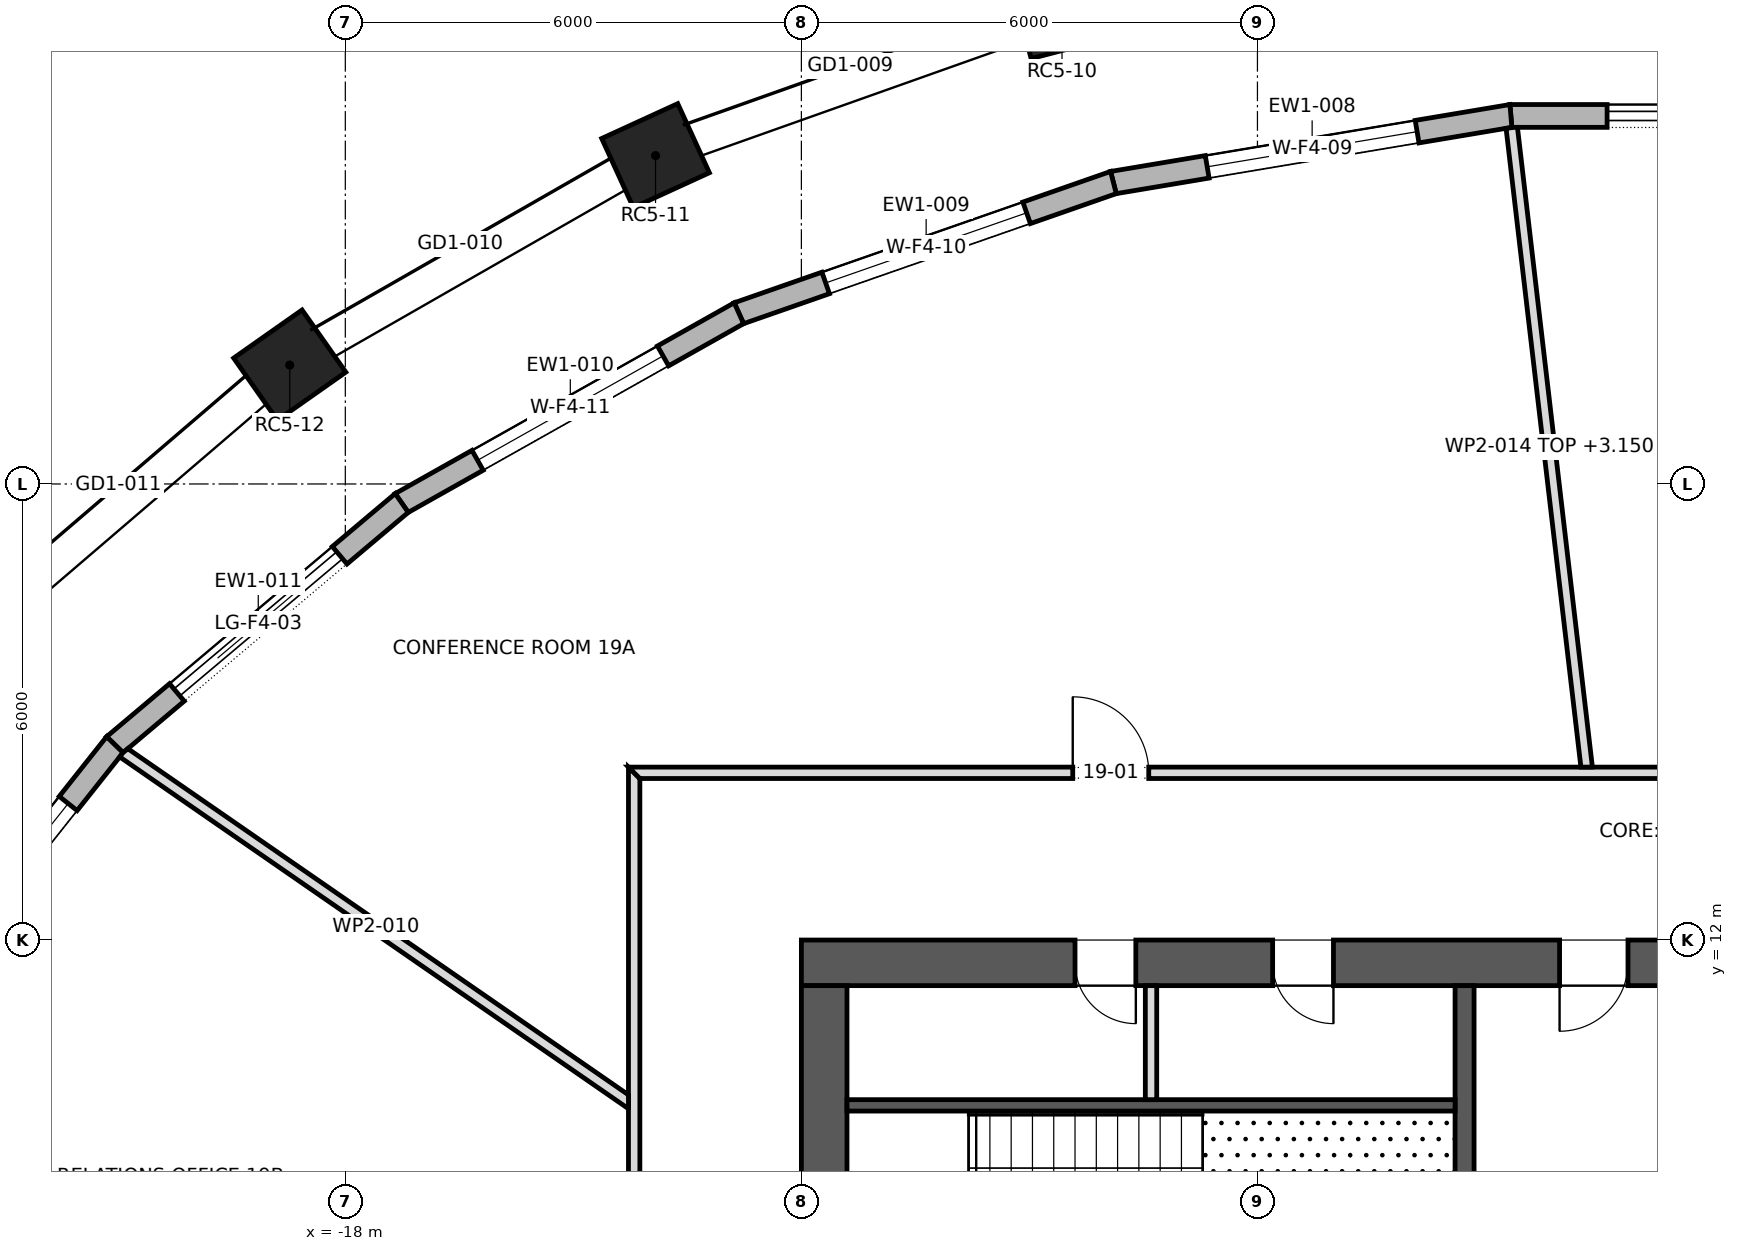
"""IFC4 building model, lengths in metres.
Left out: names, types, materials, properties, quantities, classifications, styles, units other than length and angle.
Written with IfcOpenShell. Run it as: python <this file> out.ifc"""

import sys

from ifc_helpers import new_model, si_unit, direction, frame, frame_2d, origin, origin_2d, place, context, subcontext, project, spatial, polyline, rectangle, outline, extrude, element, fill, save


model = new_model("IFC4")
c1 = context("Model", 3, precision=1e-05, world=origin(), true_north=direction((0.0, 1.0)))
c2 = subcontext(c1, "Body", "Model", "MODEL_VIEW")
j1 = project(units=[si_unit("LENGTHUNIT", "METRE"), si_unit("PLANEANGLEUNIT", "RADIAN")], contexts=[c1])
p1 = place(None, origin())
s1 = spatial("IfcSite", under=j1, at=p1, CompositionType="ELEMENT")
p2 = place(p1, origin())
s2 = spatial("IfcBuilding", under=s1, at=p2, CompositionType="ELEMENT")
p3 = place(p2, frame((0.0, 0.0, 276.3)))
s3 = spatial("IfcBuildingStorey", under=s2, at=p3, CompositionType="ELEMENT", Elevation=276.3)
for number, where, z_axis, x_axis in (
    (1, (-8.571, 24.219, 0.0), (0.0, 0.0, 1.0), (-0.968, -0.252, 0.0)),
    (2, (-13.919, 22.32, 0.0), (0.0, 0.0, 1.0), (-0.909, -0.417, 0.0)),
    (3, (-18.731, 19.564, 0.0), (0.0, 0.0, 1.0), (-0.818, -0.575, 0.0)),
):
    element("IfcColumn", number, at=place(p3, frame(where, z_axis=z_axis, x_axis=x_axis)), inside=s3, PredefinedType="COLUMN", context=c2, shape_type="SweptSolid", body=[
        extrude(rectangle(XDim=1.1, YDim=1.0, at=origin_2d()), origin(), (0.0, 0.0, 1.0), 4.0),
    ])
p4 = place(p3, frame((-12.0, 11.7, 0.0), z_axis=(0.0, 0.0, 1.0), x_axis=(1.0, 0.0, 0.0)))
e4 = element("IfcWall", 4, at=p4, inside=s3, PredefinedType="SHEAR", context=c2, shape_type="SweptSolid", body=[
    extrude(rectangle(XDim=24.0, YDim=0.6, at=frame_2d((12.0, 0.0))), origin(), (0.0, 0.0, 1.0), 4.0),
])
p5 = place(p4, frame((9.975, 0.0, 0.0)))
e5 = element("IfcOpeningElement", 5, at=p5, cuts=e4, PredefinedType="OPENING", context=c2, shape_type="SweptSolid", body=[
    extrude(rectangle(XDim=0.9, YDim=2.1, at=frame_2d((0.45, 1.05))), frame((0.0, 0.312, 0.0), z_axis=(0.0, -1.0, 0.0), x_axis=(1.0, 0.0, 0.0)), (0.0, 0.0, 1.0), 0.624),
])
p6 = place(p4, frame((3.6, 0.0, 0.0)))
e6 = element("IfcOpeningElement", 6, at=p6, cuts=e4, PredefinedType="OPENING", context=c2, shape_type="SweptSolid", body=[
    extrude(rectangle(XDim=0.8, YDim=2.1, at=frame_2d((0.4, 1.05))), frame((0.0, 0.312, 0.0), z_axis=(0.0, -1.0, 0.0), x_axis=(1.0, 0.0, 0.0)), (0.0, 0.0, 1.0), 0.624),
])
p7 = place(p4, frame((6.2, 0.0, 0.0)))
e7 = element("IfcOpeningElement", 7, at=p7, cuts=e4, PredefinedType="OPENING", context=c2, shape_type="SweptSolid", body=[
    extrude(rectangle(XDim=0.8, YDim=2.1, at=frame_2d((0.4, 1.05))), frame((0.0, 0.312, 0.0), z_axis=(0.0, -1.0, 0.0), x_axis=(1.0, 0.0, 0.0)), (0.0, 0.0, 1.0), 0.624),
])
p8 = place(p4, frame((15.85, 0.0, 0.0)))
e8 = element("IfcOpeningElement", 8, at=p8, cuts=e4, PredefinedType="OPENING", context=c2, shape_type="SweptSolid", body=[
    extrude(rectangle(XDim=0.8, YDim=2.1, at=frame_2d((0.4, 1.05))), frame((0.0, 0.312, 0.0), z_axis=(0.0, -1.0, 0.0), x_axis=(1.0, 0.0, 0.0)), (0.0, 0.0, 1.0), 0.624),
])
p9 = place(p3, frame((-11.7, -11.4, 0.0), z_axis=(0.0, 0.0, 1.0), x_axis=(0.0, 1.0, 0.0)))
e9 = element("IfcWall", 9, at=p9, inside=s3, PredefinedType="SHEAR", context=c2, shape_type="SweptSolid", body=[
    extrude(rectangle(XDim=22.8, YDim=0.6, at=frame_2d((11.4, 0.0))), origin(), (0.0, 0.0, 1.0), 4.0),
])
p10 = place(p9, frame((10.2, 0.0, 0.0)))
e10 = element("IfcOpeningElement", 10, at=p10, cuts=e9, PredefinedType="OPENING", context=c2, shape_type="SweptSolid", body=[
    extrude(rectangle(XDim=2.4, YDim=2.1, at=frame_2d((1.2, 1.05))), frame((0.0, 0.312, 0.0), z_axis=(0.0, -1.0, 0.0), x_axis=(1.0, 0.0, 0.0)), (0.0, 0.0, 1.0), 0.624),
])
p11 = place(p9, frame((18.925, 0.0, 0.0)))
e11 = element("IfcOpeningElement", 11, at=p11, cuts=e9, PredefinedType="OPENING", context=c2, shape_type="SweptSolid", body=[
    extrude(rectangle(XDim=1.2, YDim=2.1, at=frame_2d((0.6, 1.05))), frame((0.0, 0.312, 0.0), z_axis=(0.0, -1.0, 0.0), x_axis=(1.0, 0.0, 0.0)), (0.0, 0.0, 1.0), 0.624),
])
p12 = place(p9, frame((2.675, 0.0, 0.0)))
e12 = element("IfcOpeningElement", 12, at=p12, cuts=e9, PredefinedType="OPENING", context=c2, shape_type="SweptSolid", body=[
    extrude(rectangle(XDim=1.2, YDim=2.1, at=frame_2d((0.6, 1.05))), frame((0.0, 0.312, 0.0), z_axis=(0.0, -1.0, 0.0), x_axis=(1.0, 0.0, 0.0)), (0.0, 0.0, 1.0), 0.624),
])
p13 = place(p3, frame((2.666, 22.842, 0.0), z_axis=(0.0, 0.0, 1.0), x_axis=(-1.0, 0.0, 0.0)))
e13 = element("IfcWall", 13, at=p13, inside=s3, PredefinedType="STANDARD", context=c2, shape_type="SweptSolid", body=[
    extrude(outline(polyline([(-0.012, -0.15), (5.344, -0.15), (5.319, 0.15), (0.012, 0.15), (-0.012, -0.15)])), origin(), (0.0, 0.0, 1.0), 3.7),
])
p14 = place(p13, frame((1.266, 0.0, 0.0)))
e14 = element("IfcOpeningElement", 14, at=p14, cuts=e13, PredefinedType="OPENING", context=c2, shape_type="SweptSolid", body=[
    extrude(rectangle(XDim=2.8, YDim=3.25, at=frame_2d((1.4, 1.625))), frame((0.0, 0.162, 0.0), z_axis=(0.0, -1.0, 0.0), x_axis=(1.0, 0.0, 0.0)), (0.0, 0.0, 1.0), 0.324),
])
p15 = place(p3, frame((-2.666, 22.842, 0.0), z_axis=(0.0, 0.0, 1.0), x_axis=(-0.986250435411, -0.165257612993, 0.0)))
e15 = element("IfcWall", 15, at=p15, inside=s3, PredefinedType="STANDARD", context=c2, shape_type="SweptSolid", body=[
    extrude(outline(polyline([(-0.012, -0.15), (5.315, -0.15), (5.29, 0.15), (0.012, 0.15), (-0.012, -0.15)])), origin(), (0.0, 0.0, 1.0), 3.7),
])
p16 = place(p15, frame((1.251, 0.0, 0.6)))
e16 = element("IfcOpeningElement", 16, at=p16, cuts=e15, PredefinedType="OPENING", context=c2, shape_type="SweptSolid", body=[
    extrude(rectangle(XDim=2.8, YDim=2.65, at=frame_2d((1.4, 1.325))), frame((0.0, 0.162, 0.0), z_axis=(0.0, -1.0, 0.0), x_axis=(1.0, 0.0, 0.0)), (0.0, 0.0, 1.0), 0.324),
])
p17 = place(p3, frame((-7.895, 21.966, 0.0), z_axis=(0.0, 0.0, 1.0), x_axis=(-0.9441693858, -0.329460423904, 0.0)))
e17 = element("IfcWall", 17, at=p17, inside=s3, PredefinedType="STANDARD", context=c2, shape_type="SweptSolid", body=[
    extrude(outline(polyline([(-0.013, -0.15), (5.232, -0.15), (5.205, 0.15), (0.013, 0.15), (-0.013, -0.15)])), origin(), (0.0, 0.0, 1.0), 3.7),
])
p18 = place(p17, frame((1.209, 0.0, 0.6)))
e18 = element("IfcOpeningElement", 18, at=p18, cuts=e17, PredefinedType="OPENING", context=c2, shape_type="SweptSolid", body=[
    extrude(rectangle(XDim=2.8, YDim=2.65, at=frame_2d((1.4, 1.325))), frame((0.0, 0.162, 0.0), z_axis=(0.0, -1.0, 0.0), x_axis=(1.0, 0.0, 0.0)), (0.0, 0.0, 1.0), 0.324),
])
p19 = place(p3, frame((-12.822, 20.246, 0.0), z_axis=(0.0, 0.0, 1.0), x_axis=(-0.871433320402, -0.490513983585, 0.0)))
e19 = element("IfcWall", 19, at=p19, inside=s3, PredefinedType="STANDARD", context=c2, shape_type="SweptSolid", body=[
    extrude(outline(polyline([(-0.013, -0.15), (5.104, -0.15), (5.076, 0.15), (0.013, 0.15), (-0.013, -0.15)])), origin(), (0.0, 0.0, 1.0), 3.7),
])
p20 = place(p19, frame((1.145, 0.0, 0.6)))
e20 = element("IfcOpeningElement", 20, at=p20, cuts=e19, PredefinedType="OPENING", context=c2, shape_type="SweptSolid", body=[
    extrude(rectangle(XDim=2.8, YDim=2.65, at=frame_2d((1.4, 1.325))), frame((0.0, 0.162, 0.0), z_axis=(0.0, -1.0, 0.0), x_axis=(1.0, 0.0, 0.0)), (0.0, 0.0, 1.0), 0.324),
])
p21 = place(p3, frame((-17.258, 17.75, 0.0), z_axis=(0.0, 0.0, 1.0), x_axis=(-0.764832940795, -0.644228664897, 0.0)))
e21 = element("IfcWall", 21, at=p21, inside=s3, PredefinedType="STANDARD", context=c2, shape_type="SweptSolid", body=[
    extrude(outline(polyline([(-0.014, -0.15), (4.95, -0.15), (4.92, 0.15), (0.014, 0.15), (-0.014, -0.15)])), origin(), (0.0, 0.0, 1.0), 3.7),
])
p22 = place(p21, frame((1.068, 0.0, 0.0)))
e22 = element("IfcOpeningElement", 22, at=p22, cuts=e21, PredefinedType="OPENING", context=c2, shape_type="SweptSolid", body=[
    extrude(rectangle(XDim=2.8, YDim=3.25, at=frame_2d((1.4, 1.625))), frame((0.0, 0.162, 0.0), z_axis=(0.0, -1.0, 0.0), x_axis=(1.0, 0.0, 0.0)), (0.0, 0.0, 1.0), 0.324),
])
p23 = place(p3, frame((-21.032, 14.57, 0.0), z_axis=(0.0, 0.0, 1.0), x_axis=(-0.621434755851, -0.783465917715, 0.0)))
e23 = element("IfcWall", 23, at=p23, inside=s3, PredefinedType="STANDARD", context=c2, shape_type="SweptSolid", body=[
    extrude(outline(polyline([(-0.015, -0.15), (4.791, -0.15), (4.759, 0.15), (0.015, 0.15), (-0.015, -0.15)])), origin(), (0.0, 0.0, 1.0), 3.7),
])
p24 = place(p23, frame((0.987, 0.0, 0.6)))
e24 = element("IfcOpeningElement", 24, at=p24, cuts=e23, PredefinedType="OPENING", context=c2, shape_type="SweptSolid", body=[
    extrude(rectangle(XDim=2.8, YDim=2.65, at=frame_2d((1.4, 1.325))), frame((0.0, 0.162, 0.0), z_axis=(0.0, -1.0, 0.0), x_axis=(1.0, 0.0, 0.0)), (0.0, 0.0, 1.0), 0.324),
])
p25 = place(p3, frame((-3.275, 6.5, 0.0), z_axis=(0.0, 0.0, 1.0), x_axis=(0.0, 1.0, 0.0)))
e25 = element("IfcWall", 25, at=p25, inside=s3, PredefinedType="SHEAR", context=c2, shape_type="SweptSolid", body=[
    extrude(rectangle(XDim=4.9, YDim=0.25, at=frame_2d((2.45, 0.0))), origin(), (0.0, 0.0, 1.0), 3.7),
])
p26 = place(p3, frame((-11.4, 9.825, 0.0), z_axis=(0.0, 0.0, 1.0), x_axis=(1.0, 0.0, 0.0)))
e26 = element("IfcWall", 26, at=p26, inside=s3, PredefinedType="SHEAR", context=c2, shape_type="SweptSolid", body=[
    extrude(rectangle(XDim=8.0, YDim=0.15, at=frame_2d((4.0, 0.0))), origin(), (0.0, 0.0, 1.0), 3.7),
])
p27 = place(p3, frame((-7.4, 9.9, 0.0), z_axis=(0.0, 0.0, 1.0), x_axis=(0.0, 1.0, 0.0)))
e27 = element("IfcWall", 27, at=p27, inside=s3, PredefinedType="PARTITIONING", context=c2, shape_type="SweptSolid", body=[
    extrude(rectangle(XDim=1.5, YDim=0.15, at=frame_2d((0.75, 0.0))), origin(), (0.0, 0.0, 1.0), 3.7),
])
p28 = place(p3, frame((-14.2, -14.275, 0.0), z_axis=(0.0, 0.0, 1.0), x_axis=(0.0, 1.0, 0.0)))
e28 = element("IfcWall", 28, at=p28, inside=s3, PredefinedType="PARTITIONING", context=c2, shape_type="SweptSolid", body=[
    extrude(outline(polyline([(0.15, -0.075), (2.033, -0.075), (3.917, -0.075), (5.8, -0.075), (7.683, -0.075), (9.567, -0.075), (11.45, -0.075), (13.333, -0.075), (15.217, -0.075), (17.1, -0.075), (18.983, -0.075), (20.866, -0.075), (22.75, -0.075), (24.633, -0.075), (26.517, -0.075), (28.4, -0.075), (28.55, 0.075), (28.55, 0.075), (26.646, 0.075), (24.743, 0.075), (22.84, 0.075), (20.937, 0.075), (19.033, 0.075), (17.13, 0.075), (15.227, 0.075), (13.323, 0.075), (11.42, 0.075), (9.517, 0.075), (7.613, 0.075), (5.71, 0.075), (3.807, 0.075), (1.903, 0.075), (0.0, 0.075), (0.15, -0.075)])), origin(), (0.0, 0.0, 1.0), 3.7),
])
p29 = place(p28, frame((20.5, 0.0, 0.0)))
e29 = element("IfcOpeningElement", 29, at=p29, cuts=e28, PredefinedType="OPENING", context=c2, shape_type="SweptSolid", body=[
    extrude(rectangle(XDim=1.0, YDim=2.1, at=frame_2d((0.5, 1.05))), frame((0.0, 0.087, 0.0), z_axis=(0.0, -1.0, 0.0), x_axis=(1.0, 0.0, 0.0)), (0.0, 0.0, 1.0), 0.174),
])
p30 = place(p28, frame((11.595, 0.0, 0.0)))
e30 = element("IfcOpeningElement", 30, at=p30, cuts=e28, PredefinedType="OPENING", context=c2, shape_type="SweptSolid", body=[
    extrude(rectangle(XDim=1.0, YDim=2.1, at=frame_2d((0.5, 1.05))), frame((0.0, 0.087, 0.0), z_axis=(0.0, -1.0, 0.0), x_axis=(1.0, 0.0, 0.0)), (0.0, 0.0, 1.0), 0.174),
])
p31 = place(p28, frame((15.225, 0.0, 0.0)))
e31 = element("IfcOpeningElement", 31, at=p31, cuts=e28, PredefinedType="OPENING", context=c2, shape_type="SweptSolid", body=[
    extrude(rectangle(XDim=1.0, YDim=2.1, at=frame_2d((0.5, 1.05))), frame((0.0, 0.087, 0.0), z_axis=(0.0, -1.0, 0.0), x_axis=(1.0, 0.0, 0.0)), (0.0, 0.0, 1.0), 0.174),
])
p32 = place(p28, frame((4.86, 0.0, 0.0)))
e32 = element("IfcOpeningElement", 32, at=p32, cuts=e28, PredefinedType="OPENING", context=c2, shape_type="SweptSolid", body=[
    extrude(rectangle(XDim=1.0, YDim=2.1, at=frame_2d((0.5, 1.05))), frame((0.0, 0.087, 0.0), z_axis=(0.0, -1.0, 0.0), x_axis=(1.0, 0.0, 0.0)), (0.0, 0.0, 1.0), 0.174),
])
p33 = place(p3, frame((-14.232, 9.843, 0.0), z_axis=(0.0, 0.0, 1.0), x_axis=(-0.822495571588, 0.56877151363, 0.0)))
e33 = element("IfcWall", 33, at=p33, inside=s3, PredefinedType="PARTITIONING", context=c2, shape_type="SweptSolid", body=[
    extrude(outline(polyline([(0.104, -0.075), (1.705, -0.075), (3.307, -0.075), (4.908, -0.075), (6.51, -0.075), (8.112, -0.075), (8.133, 0.004), (8.137, 0.07), (8.137, 0.075), (6.51, 0.075), (4.883, 0.075), (3.255, 0.075), (1.627, 0.075), (0.0, 0.075), (0.0, 0.075), (0.104, -0.075)])), origin(), (0.0, 0.0, 1.0), 3.7),
])
p34 = place(p3, frame((-14.275, 14.2, 0.0), z_axis=(0.0, 0.0, 1.0), x_axis=(1.0, 0.0, 0.0)))
e34 = element("IfcWall", 34, at=p34, inside=s3, PredefinedType="PARTITIONING", context=c2, shape_type="SweptSolid", body=[
    extrude(outline(polyline([(0.15, -0.075), (2.033, -0.075), (3.917, -0.075), (5.8, -0.075), (7.683, -0.075), (9.567, -0.075), (11.45, -0.075), (13.333, -0.075), (15.217, -0.075), (17.1, -0.075), (18.983, -0.075), (20.866, -0.075), (22.75, -0.075), (24.633, -0.075), (26.517, -0.075), (28.4, -0.075), (28.55, 0.075), (28.55, 0.075), (26.646, 0.075), (24.743, 0.075), (22.84, 0.075), (20.937, 0.075), (19.033, 0.075), (17.13, 0.075), (15.227, 0.075), (13.323, 0.075), (11.42, 0.075), (9.517, 0.075), (7.613, 0.075), (5.71, 0.075), (3.807, 0.075), (1.903, 0.075), (0.0, 0.075), (0.15, -0.075)])), origin(), (0.0, 0.0, 1.0), 3.7),
])
p35 = place(p34, frame((5.845, 0.0, 0.0)))
e35 = element("IfcOpeningElement", 35, at=p35, cuts=e34, PredefinedType="OPENING", context=c2, shape_type="SweptSolid", body=[
    extrude(rectangle(XDim=1.0, YDim=2.1, at=frame_2d((0.5, 1.05))), frame((0.0, 0.087, 0.0), z_axis=(0.0, -1.0, 0.0), x_axis=(1.0, 0.0, 0.0)), (0.0, 0.0, 1.0), 0.174),
])
p36 = place(p34, frame((19.86, 0.0, 0.0)))
e36 = element("IfcOpeningElement", 36, at=p36, cuts=e34, PredefinedType="OPENING", context=c2, shape_type="SweptSolid", body=[
    extrude(rectangle(XDim=1.0, YDim=2.1, at=frame_2d((0.5, 1.05))), frame((0.0, 0.087, 0.0), z_axis=(0.0, -1.0, 0.0), x_axis=(1.0, 0.0, 0.0)), (0.0, 0.0, 1.0), 0.174),
])
p37 = place(p3, frame((-2.655, 22.688, 0.0), z_axis=(0.0, 0.0, 1.0), x_axis=(0.116390143686, -0.993203571506, 0.0)))
e37 = element("IfcWall", 37, at=p37, inside=s3, PredefinedType="PARTITIONING", context=c2, shape_type="SweptSolid", body=[
    extrude(outline(polyline([(0.0, -0.075), (1.692, -0.075), (3.385, -0.075), (5.077, -0.075), (6.769, -0.075), (8.461, -0.075), (8.479, 0.072), (8.479, 0.075), (6.784, 0.075), (5.089, 0.075), (3.394, 0.075), (1.699, 0.075), (0.005, 0.075), (0.0, 0.036), (0.0, -0.075)])), origin(), (0.0, 0.0, 1.0), 3.15),
])
p38 = place(p14, origin())
e38 = element("IfcDoor", 38, at=p38, inside=s3, OperationType="DOUBLE_DOOR_SLIDING", PredefinedType="DOOR", context=c2, shape_type="SweptSolid", body=[
    extrude(rectangle(XDim=2.8, YDim=3.25, at=frame_2d((1.4, 1.625))), frame((0.0, 0.025, 0.0), z_axis=(0.0, -1.0, 0.0), x_axis=(1.0, 0.0, 0.0)), (0.0, 0.0, 1.0), 0.05),
])
fill(e14, e38)
p39 = place(p16, origin())
e39 = element("IfcWindow", 39, at=p39, inside=s3, PartitioningType="DOUBLE_PANEL_VERTICAL", PredefinedType="WINDOW", context=c2, shape_type="SweptSolid", body=[
    extrude(rectangle(XDim=2.8, YDim=2.65, at=frame_2d((1.4, 1.325))), frame((0.0, 0.03, 0.0), z_axis=(0.0, -1.0, 0.0), x_axis=(1.0, 0.0, 0.0)), (0.0, 0.0, 1.0), 0.06),
])
fill(e16, e39)
p40 = place(p18, origin())
e40 = element("IfcWindow", 40, at=p40, inside=s3, PartitioningType="DOUBLE_PANEL_VERTICAL", PredefinedType="WINDOW", context=c2, shape_type="SweptSolid", body=[
    extrude(rectangle(XDim=2.8, YDim=2.65, at=frame_2d((1.4, 1.325))), frame((0.0, 0.03, 0.0), z_axis=(0.0, -1.0, 0.0), x_axis=(1.0, 0.0, 0.0)), (0.0, 0.0, 1.0), 0.06),
])
fill(e18, e40)
p41 = place(p20, origin())
e41 = element("IfcWindow", 41, at=p41, inside=s3, PartitioningType="DOUBLE_PANEL_VERTICAL", PredefinedType="WINDOW", context=c2, shape_type="SweptSolid", body=[
    extrude(rectangle(XDim=2.8, YDim=2.65, at=frame_2d((1.4, 1.325))), frame((0.0, 0.03, 0.0), z_axis=(0.0, -1.0, 0.0), x_axis=(1.0, 0.0, 0.0)), (0.0, 0.0, 1.0), 0.06),
])
fill(e20, e41)
p42 = place(p22, origin())
e42 = element("IfcDoor", 42, at=p42, inside=s3, OperationType="DOUBLE_DOOR_SLIDING", PredefinedType="DOOR", context=c2, shape_type="SweptSolid", body=[
    extrude(rectangle(XDim=2.8, YDim=3.25, at=frame_2d((1.4, 1.625))), frame((0.0, 0.025, 0.0), z_axis=(0.0, -1.0, 0.0), x_axis=(1.0, 0.0, 0.0)), (0.0, 0.0, 1.0), 0.05),
])
fill(e22, e42)
p43 = place(p24, origin())
e43 = element("IfcWindow", 43, at=p43, inside=s3, PartitioningType="DOUBLE_PANEL_VERTICAL", PredefinedType="WINDOW", context=c2, shape_type="SweptSolid", body=[
    extrude(rectangle(XDim=2.8, YDim=2.65, at=frame_2d((1.4, 1.325))), frame((0.0, 0.03, 0.0), z_axis=(0.0, -1.0, 0.0), x_axis=(1.0, 0.0, 0.0)), (0.0, 0.0, 1.0), 0.06),
])
fill(e24, e43)
p44 = place(p5, frame((0.9, 0.0, 0.0), z_axis=(0.0, 0.0, 1.0), x_axis=(-1.0, 0.0, 0.0)))
e44 = element("IfcDoor", 44, at=p44, inside=s3, OperationType="SINGLE_SWING_LEFT", PredefinedType="DOOR", context=c2, shape_type="SweptSolid", body=[
    extrude(rectangle(XDim=0.9, YDim=2.1, at=frame_2d((0.45, 1.05))), frame((0.0, 0.025, 0.0), z_axis=(0.0, -1.0, 0.0), x_axis=(1.0, 0.0, 0.0)), (0.0, 0.0, 1.0), 0.05),
])
fill(e5, e44)
p45 = place(p6, frame((0.8, 0.0, 0.0), z_axis=(0.0, 0.0, 1.0), x_axis=(-1.0, 0.0, 0.0)))
e45 = element("IfcDoor", 45, at=p45, inside=s3, OperationType="SINGLE_SWING_RIGHT", PredefinedType="DOOR", context=c2, shape_type="SweptSolid", body=[
    extrude(rectangle(XDim=0.8, YDim=2.1, at=frame_2d((0.4, 1.05))), frame((0.0, 0.025, 0.0), z_axis=(0.0, -1.0, 0.0), x_axis=(1.0, 0.0, 0.0)), (0.0, 0.0, 1.0), 0.05),
])
fill(e6, e45)
p46 = place(p7, frame((0.8, 0.0, 0.0), z_axis=(0.0, 0.0, 1.0), x_axis=(-1.0, 0.0, 0.0)))
e46 = element("IfcDoor", 46, at=p46, inside=s3, OperationType="SINGLE_SWING_RIGHT", PredefinedType="DOOR", context=c2, shape_type="SweptSolid", body=[
    extrude(rectangle(XDim=0.8, YDim=2.1, at=frame_2d((0.4, 1.05))), frame((0.0, 0.025, 0.0), z_axis=(0.0, -1.0, 0.0), x_axis=(1.0, 0.0, 0.0)), (0.0, 0.0, 1.0), 0.05),
])
fill(e7, e46)
p47 = place(p35, origin())
e47 = element("IfcDoor", 47, at=p47, inside=s3, OperationType="SINGLE_SWING_RIGHT", PredefinedType="DOOR", context=c2, shape_type="SweptSolid", body=[
    extrude(rectangle(XDim=1.0, YDim=2.1, at=frame_2d((0.5, 1.05))), frame((0.0, 0.025, 0.0), z_axis=(0.0, -1.0, 0.0), x_axis=(1.0, 0.0, 0.0)), (0.0, 0.0, 1.0), 0.05),
])
fill(e35, e47)
save(model, sys.argv[1])
